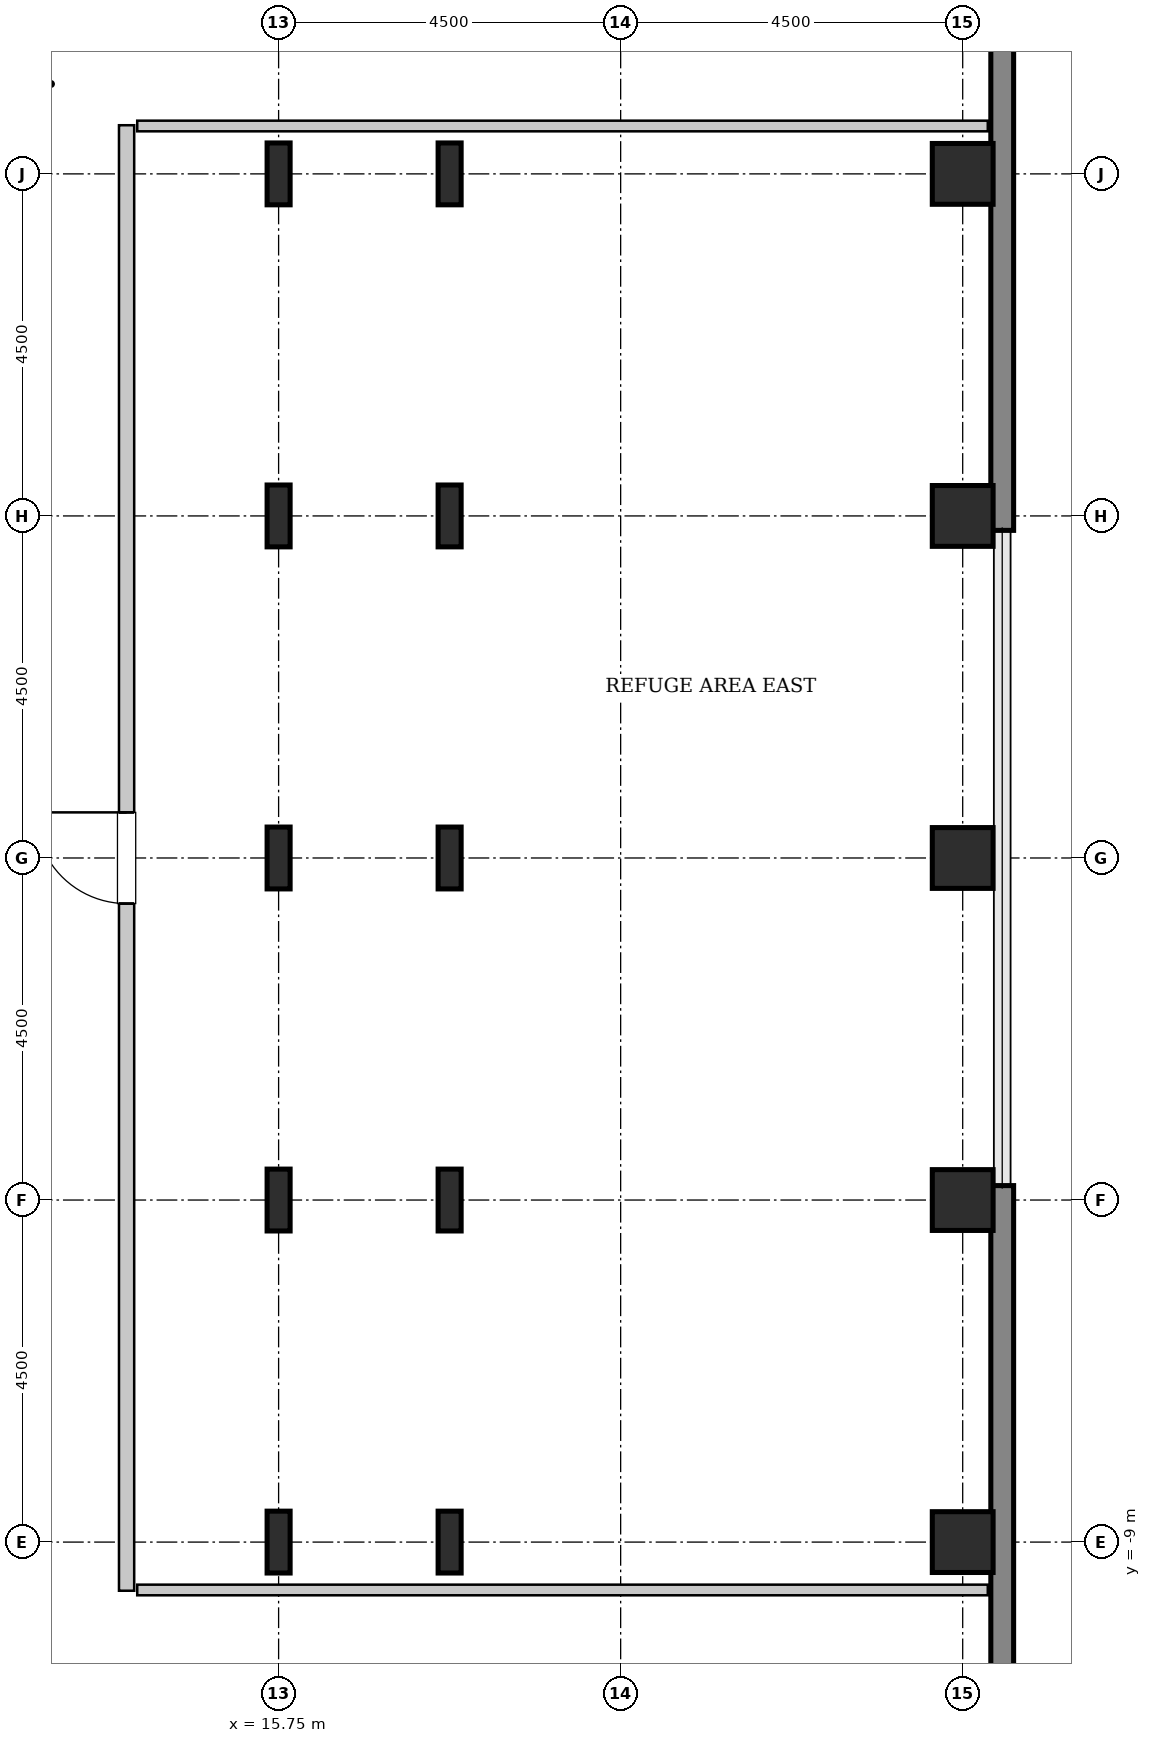
"""IFC4 building model, lengths in metres.
Left out: names, types, materials, properties, quantities, classifications, styles, units other than length and angle.
Written with IfcOpenShell. Run it as: python <this file> out.ifc"""

import sys

from ifc_helpers import new_model, si_unit, direction, frame, frame_2d, origin, origin_2d, place, context, subcontext, project, spatial, rectangle, hollow_rectangle, i_section, extrude, source, transform, mapped, element, fill, save


model = new_model("IFC4")
c1 = context("Model", 3, precision=1e-05, world=origin(), true_north=direction((0.0, 1.0)))
c2 = subcontext(c1, "Body", "Model", "MODEL_VIEW")
j1 = project(units=[si_unit("LENGTHUNIT", "METRE"), si_unit("PLANEANGLEUNIT", "RADIAN")], contexts=[c1])
p1 = place(None, origin())
s1 = spatial("IfcSite", under=j1, at=p1, CompositionType="ELEMENT")
p2 = place(p1, origin())
s2 = spatial("IfcBuilding", under=s1, at=p2, CompositionType="ELEMENT")
p3 = place(p2, frame((0.0, 0.0, 202.0)))
s3 = spatial("IfcBuildingStorey", under=s2, at=p3, CompositionType="ELEMENT", Elevation=202.0)
m1 = source(origin(), c2, "Body", "SweptSolid", [
    extrude(i_section(OverallWidth=0.303, OverallDepth=0.814, WebThickness=0.021, FlangeThickness=0.04, FilletRadius=0.03, at=origin_2d()), origin(), (0.0, 0.0, 1.0), 4.6),
])
for number, where, z_axis, x_axis in (
    (1, (15.75, -9.0, 0.0), (0.0, 0.0, 1.0), (1.0, 0.0, 0.0)),
    (2, (15.75, -4.5, 0.0), (0.0, 0.0, 1.0), (1.0, 0.0, 0.0)),
    (3, (15.75, 0.0, 0.0), (0.0, 0.0, 1.0), (1.0, 0.0, 0.0)),
    (4, (15.75, 4.5, 0.0), (0.0, 0.0, 1.0), (1.0, 0.0, 0.0)),
    (5, (15.75, 9.0, 0.0), (0.0, 0.0, 1.0), (1.0, 0.0, 0.0)),
    (6, (18.0, -9.0, 0.0), (0.0, 0.0, 1.0), (1.0, 0.0, 0.0)),
    (7, (18.0, -4.5, 0.0), (0.0, 0.0, 1.0), (1.0, 0.0, 0.0)),
    (8, (18.0, 0.0, 0.0), (0.0, 0.0, 1.0), (1.0, 0.0, 0.0)),
    (9, (18.0, 4.5, 0.0), (0.0, 0.0, 1.0), (1.0, 0.0, 0.0)),
    (10, (18.0, 9.0, 0.0), (0.0, 0.0, 1.0), (1.0, 0.0, 0.0)),
):
    element("IfcColumn", number, at=place(p3, frame(where, z_axis=z_axis, x_axis=x_axis)), inside=s3, PredefinedType="COLUMN", context=c2, shape_type="MappedRepresentation", body=[
        mapped(m1, transform((0.0, 0.0, 0.0), x_axis=(1.0, 0.0, 0.0), y_axis=(0.0, 1.0, 0.0), z_axis=(0.0, 0.0, 1.0), scale=1.0)),
    ])
m2 = source(origin(), c2, "Body", "SweptSolid", [
    extrude(hollow_rectangle(XDim=0.8, YDim=0.8, WallThickness=0.04, InnerFilletRadius=0.04, OuterFilletRadius=0.08, at=origin_2d()), origin(), (0.0, 0.0, 1.0), 4.6),
])
for number, where, z_axis, x_axis in (
    (11, (24.75, -9.0, 0.0), (0.0, 0.0, 1.0), (1.0, 0.0, 0.0)),
    (12, (24.75, -4.5, 0.0), (0.0, 0.0, 1.0), (1.0, 0.0, 0.0)),
    (13, (24.75, 0.0, 0.0), (0.0, 0.0, 1.0), (1.0, 0.0, 0.0)),
    (14, (24.75, 4.5, 0.0), (0.0, 0.0, 1.0), (1.0, 0.0, 0.0)),
    (15, (24.75, 9.0, 0.0), (0.0, 0.0, 1.0), (1.0, 0.0, 0.0)),
):
    element("IfcColumn", number, at=place(p3, frame(where, z_axis=z_axis, x_axis=x_axis)), inside=s3, PredefinedType="COLUMN", context=c2, shape_type="MappedRepresentation", body=[
        mapped(m2, transform((0.0, 0.0, 0.0), x_axis=(1.0, 0.0, 0.0), y_axis=(0.0, 1.0, 0.0), z_axis=(0.0, 0.0, 1.0), scale=1.0)),
    ])
m3 = source(origin(), c2, "Body", "SweptSolid", [
    extrude(rectangle(XDim=9.38, YDim=0.3, at=frame_2d((4.69, 0.0))), origin(), (0.0, 0.0, 1.0), 4.35),
])
for number, where, z_axis, x_axis in (
    (16, (25.27, -13.69, 0.0), (0.0, 0.0, 1.0), (0.0, 1.0, 0.0)),
    (17, (25.27, 4.31, 0.0), (0.0, 0.0, 1.0), (0.0, 1.0, 0.0)),
):
    element("IfcWall", number, at=place(p3, frame(where, z_axis=z_axis, x_axis=x_axis)), inside=s3, PredefinedType="SHEAR", context=c2, shape_type="MappedRepresentation", body=[
        mapped(m3, transform((0.0, 0.0, 0.0), x_axis=(1.0, 0.0, 0.0), y_axis=(0.0, 1.0, 0.0), z_axis=(0.0, 0.0, 1.0), scale=1.0)),
    ])
m4 = source(origin(), c2, "Body", "SweptSolid", [
    extrude(rectangle(XDim=19.28, YDim=0.2, at=frame_2d((9.64, 0.0))), origin(), (0.0, 0.0, 1.0), 4.335),
])
p4 = place(p3, frame((13.75, -9.64, 0.0), z_axis=(0.0, 0.0, 1.0), x_axis=(0.0, 1.0, 0.0)))
e18 = element("IfcWall", 18, at=p4, inside=s3, PredefinedType="SOLIDWALL", context=c2, shape_type="MappedRepresentation", body=[
    mapped(m4, transform((0.0, 0.0, 0.0), x_axis=(1.0, 0.0, 0.0), y_axis=(0.0, 1.0, 0.0), z_axis=(0.0, 0.0, 1.0), scale=1.0)),
])
p5 = place(p4, frame((9.04, 0.0, 0.0)))
e19 = element("IfcOpeningElement", 19, at=p5, cuts=e18, PredefinedType="OPENING", context=c2, shape_type="SweptSolid", body=[
    extrude(rectangle(XDim=1.2, YDim=2.15, at=frame_2d((0.6, 1.075))), frame((0.0, 0.11, 0.0), z_axis=(0.0, -1.0, 0.0), x_axis=(1.0, 0.0, 0.0)), (0.0, 0.0, 1.0), 0.22),
])
m5 = source(origin(), c2, "Body", "SweptSolid", [
    extrude(rectangle(XDim=11.19, YDim=0.14, at=frame_2d((5.595, 0.0))), origin(), (0.0, 0.0, 1.0), 4.335),
])
for number, where, z_axis, x_axis in (
    (20, (13.89, 9.63, 0.0), (0.0, 0.0, 1.0), (1.0, 0.0, 0.0)),
    (21, (13.89, -9.63, 0.0), (0.0, 0.0, 1.0), (1.0, 0.0, 0.0)),
):
    element("IfcWall", number, at=place(p3, frame(where, z_axis=z_axis, x_axis=x_axis)), inside=s3, PredefinedType="PARTITIONING", context=c2, shape_type="MappedRepresentation", body=[
        mapped(m5, transform((0.0, 0.0, 0.0), x_axis=(1.0, 0.0, 0.0), y_axis=(0.0, 1.0, 0.0), z_axis=(0.0, 0.0, 1.0), scale=1.0)),
    ])
m6 = source(origin(), c2, "Body", "SweptSolid", [
    extrude(rectangle(XDim=1.2, YDim=2.15, at=frame_2d((0.6, 1.075))), frame((0.0, 0.025, 0.0), z_axis=(0.0, -1.0, 0.0), x_axis=(1.0, 0.0, 0.0)), (0.0, 0.0, 1.0), 0.05),
])
p6 = place(p5, origin())
e22 = element("IfcDoor", 22, at=p6, inside=s3, OperationType="SINGLE_SWING_RIGHT", PredefinedType="DOOR", context=c2, shape_type="MappedRepresentation", body=[
    mapped(m6, transform((0.0, 0.0, 0.0), x_axis=(1.0, 0.0, 0.0), y_axis=(0.0, 1.0, 0.0), z_axis=(0.0, 0.0, 1.0), scale=1.0)),
])
fill(e19, e22)
save(model, sys.argv[1])
